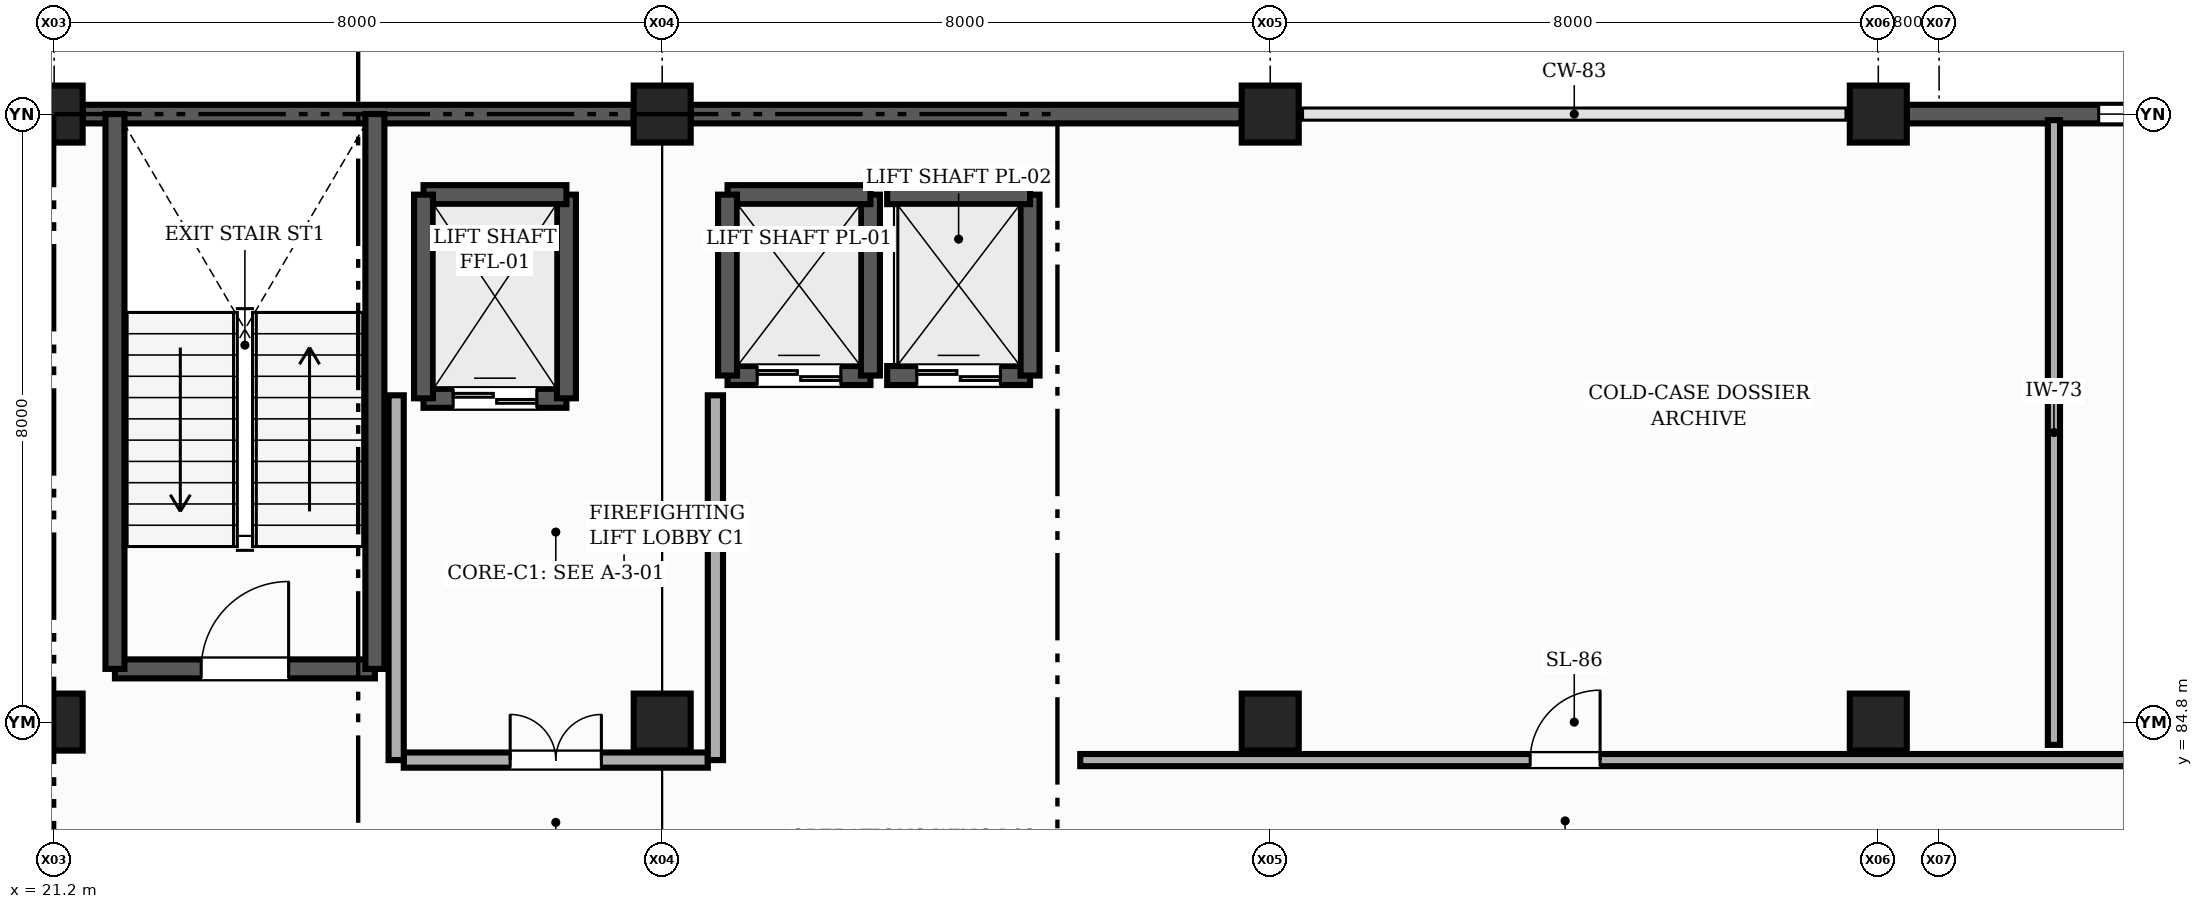
"""IFC4 building model, lengths in metres.
Left out: names, types, materials, properties, quantities, classifications, styles, units other than length and angle.
Written with IfcOpenShell. Run it as: python <this file> out.ifc"""

import sys

from ifc_helpers import new_model, si_unit, direction, frame, frame_2d, origin, origin_2d, place, context, subcontext, project, spatial, rectangle, extrude, element, fill, save


model = new_model("IFC4")
c1 = context("Model", 3, precision=1e-05, world=origin(), true_north=direction((0.0, 1.0)))
c2 = subcontext(c1, "Body", "Model", "MODEL_VIEW")
j1 = project(units=[si_unit("LENGTHUNIT", "METRE"), si_unit("PLANEANGLEUNIT", "RADIAN")], contexts=[c1])
p1 = place(None, origin())
s1 = spatial("IfcSite", under=j1, at=p1, CompositionType="ELEMENT")
p2 = place(p1, origin())
s2 = spatial("IfcBuilding", under=s1, at=p2, CompositionType="ELEMENT")
p3 = place(p2, frame((0.0, 0.0, 9.0)))
s3 = spatial("IfcBuildingStorey", under=s2, at=p3, CompositionType="ELEMENT", Elevation=9.0)
for number, where, z_axis, x_axis in (
    (1, (21.2, 84.8, 0.0), (0.0, 0.0, 1.0), (1.0, 0.0, 0.0)),
    (2, (21.2, 92.8, 0.0), (0.0, 0.0, 1.0), (1.0, 0.0, 0.0)),
    (3, (29.2, 84.8, 0.0), (0.0, 0.0, 1.0), (1.0, 0.0, 0.0)),
    (4, (29.2, 92.8, 0.0), (0.0, 0.0, 1.0), (1.0, 0.0, 0.0)),
    (5, (37.2, 84.8, 0.0), (0.0, 0.0, 1.0), (1.0, 0.0, 0.0)),
    (6, (37.2, 92.8, 0.0), (0.0, 0.0, 1.0), (1.0, 0.0, 0.0)),
    (7, (45.2, 84.8, 0.0), (0.0, 0.0, 1.0), (1.0, 0.0, 0.0)),
    (8, (45.2, 92.8, 0.0), (0.0, 0.0, 1.0), (1.0, 0.0, 0.0)),
):
    element("IfcColumn", number, at=place(p3, frame(where, z_axis=z_axis, x_axis=x_axis)), inside=s3, PredefinedType="COLUMN", context=c2, shape_type="SweptSolid", body=[
        extrude(rectangle(XDim=0.75, YDim=0.75, at=origin_2d()), origin(), (0.0, 0.0, 1.0), 4.5),
    ])
p4 = place(p3, frame((53.625, 92.8, 0.0), z_axis=(0.0, 0.0, 1.0), x_axis=(-1.0, 0.0, 0.0)))
e9 = element("IfcWall", 9, at=p4, inside=s3, PredefinedType="SOLIDWALL", context=c2, shape_type="SweptSolid", body=[
    extrude(rectangle(XDim=8.05, YDim=0.245, at=frame_2d((4.025, 0.0))), origin(), (0.0, 0.0, 1.0), 3.57),
])
p5 = place(p4, frame((2.525, 0.0, 0.9)))
e10 = element("IfcOpeningElement", 10, at=p5, cuts=e9, PredefinedType="OPENING", context=c2, shape_type="SweptSolid", body=[
    extrude(rectangle(XDim=3.0, YDim=1.8, at=frame_2d((1.5, 0.9))), frame((0.0, 0.133, 0.0), z_axis=(0.0, -1.0, 0.0), x_axis=(1.0, 0.0, 0.0)), (0.0, 0.0, 1.0), 0.265),
])
p6 = place(p3, frame((36.825, 92.8, 0.0), z_axis=(0.0, 0.0, 1.0), x_axis=(-1.0, 0.0, 0.0)))
e11 = element("IfcWall", 11, at=p6, inside=s3, PredefinedType="SOLIDWALL", context=c2, shape_type="SweptSolid", body=[
    extrude(rectangle(XDim=7.25, YDim=0.245, at=frame_2d((3.625, 0.0))), origin(), (0.0, 0.0, 1.0), 3.57),
])
p7 = place(p3, frame((28.825, 92.8, 0.0), z_axis=(0.0, 0.0, 1.0), x_axis=(-1.0, 0.0, 0.0)))
e12 = element("IfcWall", 12, at=p7, inside=s3, PredefinedType="SOLIDWALL", context=c2, shape_type="SweptSolid", body=[
    extrude(rectangle(XDim=7.25, YDim=0.245, at=frame_2d((3.625, 0.0))), origin(), (0.0, 0.0, 1.0), 4.22),
])
p8 = place(p3, frame((22.0, 85.5, 0.0), z_axis=(0.0, 0.0, 1.0), x_axis=(1.0, 0.0, 0.0)))
e13 = element("IfcWall", 13, at=p8, inside=s3, PredefinedType="SHEAR", context=c2, shape_type="SweptSolid", body=[
    extrude(rectangle(XDim=3.42, YDim=0.25, at=frame_2d((1.71, 0.0))), origin(), (0.0, 0.0, 1.0), 4.5),
])
p9 = place(p8, frame((1.135, 0.0, 0.0)))
e14 = element("IfcOpeningElement", 14, at=p9, cuts=e13, PredefinedType="OPENING", context=c2, shape_type="SweptSolid", body=[
    extrude(rectangle(XDim=1.15, YDim=2.15, at=frame_2d((0.575, 1.075))), frame((0.0, 0.135, 0.0), z_axis=(0.0, -1.0, 0.0), x_axis=(1.0, 0.0, 0.0)), (0.0, 0.0, 1.0), 0.27),
])
for number, where, z_axis, x_axis in (
    (15, (25.42, 85.5, 0.0), (0.0, 0.0, 1.0), (0.0, 1.0, 0.0)),
    (16, (22.0, 92.8, 0.0), (0.0, 0.0, 1.0), (0.0, -1.0, 0.0)),
):
    element("IfcWall", number, at=place(p3, frame(where, z_axis=z_axis, x_axis=x_axis)), inside=s3, PredefinedType="SHEAR", context=c2, shape_type="SweptSolid", body=[
        extrude(rectangle(XDim=7.3, YDim=0.25, at=frame_2d((3.65, 0.0))), origin(), (0.0, 0.0, 1.0), 4.5),
    ])
p10 = place(p3, frame((26.06, 89.06, 0.0), z_axis=(0.0, 0.0, 1.0), x_axis=(1.0, 0.0, 0.0)))
e17 = element("IfcWall", 17, at=p10, inside=s3, PredefinedType="SHEAR", context=c2, shape_type="SweptSolid", body=[
    extrude(rectangle(XDim=1.88, YDim=0.25, at=frame_2d((0.94, 0.0))), origin(), (0.0, 0.0, 1.0), 4.5),
])
p11 = place(p10, frame((0.39, 0.0, 0.0)))
e18 = element("IfcOpeningElement", 18, at=p11, cuts=e17, PredefinedType="OPENING", context=c2, shape_type="SweptSolid", body=[
    extrude(rectangle(XDim=1.1, YDim=2.2, at=frame_2d((0.55, 1.1))), frame((0.0, 0.135, 0.0), z_axis=(0.0, -1.0, 0.0), x_axis=(1.0, 0.0, 0.0)), (0.0, 0.0, 1.0), 0.27),
])
p12 = place(p3, frame((27.94, 89.06, 0.0), z_axis=(0.0, 0.0, 1.0), x_axis=(0.0, 1.0, 0.0)))
e19 = element("IfcWall", 19, at=p12, inside=s3, PredefinedType="SHEAR", context=c2, shape_type="SweptSolid", body=[
    extrude(rectangle(XDim=2.68, YDim=0.25, at=frame_2d((1.34, 0.0))), origin(), (0.0, 0.0, 1.0), 4.5),
])
p13 = place(p3, frame((27.94, 91.74, 0.0), z_axis=(0.0, 0.0, 1.0), x_axis=(-1.0, 0.0, 0.0)))
e20 = element("IfcWall", 20, at=p13, inside=s3, PredefinedType="SHEAR", context=c2, shape_type="SweptSolid", body=[
    extrude(rectangle(XDim=1.88, YDim=0.25, at=frame_2d((0.94, 0.0))), origin(), (0.0, 0.0, 1.0), 4.5),
])
p14 = place(p3, frame((26.06, 91.74, 0.0), z_axis=(0.0, 0.0, 1.0), x_axis=(0.0, -1.0, 0.0)))
e21 = element("IfcWall", 21, at=p14, inside=s3, PredefinedType="SHEAR", context=c2, shape_type="SweptSolid", body=[
    extrude(rectangle(XDim=2.68, YDim=0.25, at=frame_2d((1.34, 0.0))), origin(), (0.0, 0.0, 1.0), 4.5),
])
p15 = place(p3, frame((30.06, 89.36, 0.0), z_axis=(0.0, 0.0, 1.0), x_axis=(1.0, 0.0, 0.0)))
e22 = element("IfcWall", 22, at=p15, inside=s3, PredefinedType="SHEAR", context=c2, shape_type="SweptSolid", body=[
    extrude(rectangle(XDim=1.88, YDim=0.25, at=frame_2d((0.94, 0.0))), origin(), (0.0, 0.0, 1.0), 4.5),
])
p16 = place(p15, frame((0.39, 0.0, 0.0)))
e23 = element("IfcOpeningElement", 23, at=p16, cuts=e22, PredefinedType="OPENING", context=c2, shape_type="SweptSolid", body=[
    extrude(rectangle(XDim=1.1, YDim=2.2, at=frame_2d((0.55, 1.1))), frame((0.0, 0.135, 0.0), z_axis=(0.0, -1.0, 0.0), x_axis=(1.0, 0.0, 0.0)), (0.0, 0.0, 1.0), 0.27),
])
p17 = place(p3, frame((31.94, 89.36, 0.0), z_axis=(0.0, 0.0, 1.0), x_axis=(0.0, 1.0, 0.0)))
e24 = element("IfcWall", 24, at=p17, inside=s3, PredefinedType="SHEAR", context=c2, shape_type="SweptSolid", body=[
    extrude(rectangle(XDim=2.38, YDim=0.25, at=frame_2d((1.19, 0.0))), origin(), (0.0, 0.0, 1.0), 4.5),
])
p18 = place(p3, frame((31.94, 91.74, 0.0), z_axis=(0.0, 0.0, 1.0), x_axis=(-1.0, 0.0, 0.0)))
e25 = element("IfcWall", 25, at=p18, inside=s3, PredefinedType="SHEAR", context=c2, shape_type="SweptSolid", body=[
    extrude(rectangle(XDim=1.88, YDim=0.25, at=frame_2d((0.94, 0.0))), origin(), (0.0, 0.0, 1.0), 4.5),
])
p19 = place(p3, frame((30.06, 91.74, 0.0), z_axis=(0.0, 0.0, 1.0), x_axis=(0.0, -1.0, 0.0)))
e26 = element("IfcWall", 26, at=p19, inside=s3, PredefinedType="SHEAR", context=c2, shape_type="SweptSolid", body=[
    extrude(rectangle(XDim=2.38, YDim=0.25, at=frame_2d((1.19, 0.0))), origin(), (0.0, 0.0, 1.0), 4.5),
])
p20 = place(p3, frame((32.16, 89.36, 0.0), z_axis=(0.0, 0.0, 1.0), x_axis=(1.0, 0.0, 0.0)))
e27 = element("IfcWall", 27, at=p20, inside=s3, PredefinedType="SHEAR", context=c2, shape_type="SweptSolid", body=[
    extrude(rectangle(XDim=1.88, YDim=0.25, at=frame_2d((0.94, 0.0))), origin(), (0.0, 0.0, 1.0), 4.5),
])
p21 = place(p20, frame((0.39, 0.0, 0.0)))
e28 = element("IfcOpeningElement", 28, at=p21, cuts=e27, PredefinedType="OPENING", context=c2, shape_type="SweptSolid", body=[
    extrude(rectangle(XDim=1.1, YDim=2.2, at=frame_2d((0.55, 1.1))), frame((0.0, 0.135, 0.0), z_axis=(0.0, -1.0, 0.0), x_axis=(1.0, 0.0, 0.0)), (0.0, 0.0, 1.0), 0.27),
])
p22 = place(p3, frame((34.04, 89.36, 0.0), z_axis=(0.0, 0.0, 1.0), x_axis=(0.0, 1.0, 0.0)))
e29 = element("IfcWall", 29, at=p22, inside=s3, PredefinedType="SHEAR", context=c2, shape_type="SweptSolid", body=[
    extrude(rectangle(XDim=2.38, YDim=0.25, at=frame_2d((1.19, 0.0))), origin(), (0.0, 0.0, 1.0), 4.5),
])
p23 = place(p3, frame((34.04, 91.74, 0.0), z_axis=(0.0, 0.0, 1.0), x_axis=(-1.0, 0.0, 0.0)))
e30 = element("IfcWall", 30, at=p23, inside=s3, PredefinedType="SHEAR", context=c2, shape_type="SweptSolid", body=[
    extrude(rectangle(XDim=1.88, YDim=0.25, at=frame_2d((0.94, 0.0))), origin(), (0.0, 0.0, 1.0), 4.5),
])
p24 = place(p3, frame((25.8, 84.3, 0.0), z_axis=(0.0, 0.0, 1.0), x_axis=(1.0, 0.0, 0.0)))
e31 = element("IfcWall", 31, at=p24, inside=s3, PredefinedType="PARTITIONING", context=c2, shape_type="SweptSolid", body=[
    extrude(rectangle(XDim=4.0, YDim=0.2, at=frame_2d((2.0, 0.0))), origin(), (0.0, 0.0, 1.0), 3.555),
])
p25 = place(p24, frame((1.4, 0.0, 0.0)))
e32 = element("IfcOpeningElement", 32, at=p25, cuts=e31, PredefinedType="OPENING", context=c2, shape_type="SweptSolid", body=[
    extrude(rectangle(XDim=1.2, YDim=2.15, at=frame_2d((0.6, 1.075))), frame((0.0, 0.11, 0.0), z_axis=(0.0, -1.0, 0.0), x_axis=(1.0, 0.0, 0.0)), (0.0, 0.0, 1.0), 0.22),
])
p26 = place(p3, frame((25.7, 84.3, 0.0), z_axis=(0.0, 0.0, 1.0), x_axis=(0.0, 1.0, 0.0)))
e33 = element("IfcWall", 33, at=p26, inside=s3, PredefinedType="PARTITIONING", context=c2, shape_type="SweptSolid", body=[
    extrude(rectangle(XDim=4.8, YDim=0.2, at=frame_2d((2.4, 0.0))), origin(), (0.0, 0.0, 1.0), 3.355),
])
p27 = place(p3, frame((29.9, 84.3, 0.0), z_axis=(0.0, 0.0, 1.0), x_axis=(0.0, 1.0, 0.0)))
e34 = element("IfcWall", 34, at=p27, inside=s3, PredefinedType="PARTITIONING", context=c2, shape_type="SweptSolid", body=[
    extrude(rectangle(XDim=4.8, YDim=0.2, at=frame_2d((2.4, 0.0))), origin(), (0.0, 0.0, 1.0), 3.455),
])
p28 = place(p3, frame((47.511, 84.5, 0.0), z_axis=(0.0, 0.0, 1.0), x_axis=(0.0, 1.0, 0.0)))
e35 = element("IfcWall", 35, at=p28, inside=s3, PredefinedType="PARTITIONING", context=c2, shape_type="SweptSolid", body=[
    extrude(rectangle(XDim=8.22, YDim=0.16, at=frame_2d((4.11, 0.0))), origin(), (0.0, 0.0, 1.0), 3.555),
])
p29 = place(p3, frame((34.7, 84.3, 0.0), z_axis=(0.0, 0.0, 1.0), x_axis=(1.0, 0.0, 0.0)))
e36 = element("IfcWall", 36, at=p29, inside=s3, PredefinedType="PARTITIONING", context=c2, shape_type="SweptSolid", body=[
    extrude(rectangle(XDim=35.4, YDim=0.16, at=frame_2d((17.7, 0.0))), origin(), (0.0, 0.0, 1.0), 3.555),
])
p30 = place(p29, frame((5.92, 0.0, 0.0)))
e37 = element("IfcOpeningElement", 37, at=p30, cuts=e36, PredefinedType="OPENING", context=c2, shape_type="SweptSolid", body=[
    extrude(rectangle(XDim=0.92, YDim=2.1, at=frame_2d((0.46, 1.05))), frame((0.0, 0.09, 0.0), z_axis=(0.0, -1.0, 0.0), x_axis=(1.0, 0.0, 0.0)), (0.0, 0.0, 1.0), 0.18),
])
p31 = place(p29, frame((17.2, 0.0, 0.0)))
e38 = element("IfcOpeningElement", 38, at=p31, cuts=e36, PredefinedType="OPENING", context=c2, shape_type="SweptSolid", body=[
    extrude(rectangle(XDim=0.95, YDim=2.15, at=frame_2d((0.475, 1.075))), frame((0.0, 0.09, 0.0), z_axis=(0.0, -1.0, 0.0), x_axis=(1.0, 0.0, 0.0)), (0.0, 0.0, 1.0), 0.18),
])
p32 = place(p29, frame((28.48, 0.0, 0.0)))
e39 = element("IfcOpeningElement", 39, at=p32, cuts=e36, PredefinedType="OPENING", context=c2, shape_type="SweptSolid", body=[
    extrude(rectangle(XDim=0.98, YDim=2.12, at=frame_2d((0.49, 1.06))), frame((0.0, 0.09, 0.0), z_axis=(0.0, -1.0, 0.0), x_axis=(1.0, 0.0, 0.0)), (0.0, 0.0, 1.0), 0.18),
])
p33 = place(p5, origin())
e40 = element("IfcWindow", 40, at=p33, inside=s3, PartitioningType="SINGLE_PANEL", PredefinedType="WINDOW", context=c2, shape_type="SweptSolid", body=[
    extrude(rectangle(XDim=3.0, YDim=1.8, at=frame_2d((1.5, 0.9))), frame((0.0, 0.03, 0.0), z_axis=(0.0, -1.0, 0.0), x_axis=(1.0, 0.0, 0.0)), (0.0, 0.0, 1.0), 0.06),
])
fill(e10, e40)
p34 = place(p9, origin())
e41 = element("IfcDoor", 41, at=p34, inside=s3, OperationType="SINGLE_SWING_RIGHT", PredefinedType="DOOR", context=c2, shape_type="SweptSolid", body=[
    extrude(rectangle(XDim=1.15, YDim=2.15, at=frame_2d((0.575, 1.075))), frame((0.0, 0.025, 0.0), z_axis=(0.0, -1.0, 0.0), x_axis=(1.0, 0.0, 0.0)), (0.0, 0.0, 1.0), 0.05),
])
fill(e14, e41)
p35 = place(p11, origin())
e42 = element("IfcDoor", 42, at=p35, inside=s3, OperationType="DOUBLE_DOOR_SLIDING", PredefinedType="DOOR", context=c2, shape_type="SweptSolid", body=[
    extrude(rectangle(XDim=1.1, YDim=2.2, at=frame_2d((0.55, 1.1))), frame((0.0, 0.025, 0.0), z_axis=(0.0, -1.0, 0.0), x_axis=(1.0, 0.0, 0.0)), (0.0, 0.0, 1.0), 0.05),
])
fill(e18, e42)
p36 = place(p16, origin())
e43 = element("IfcDoor", 43, at=p36, inside=s3, OperationType="DOUBLE_DOOR_SLIDING", PredefinedType="DOOR", context=c2, shape_type="SweptSolid", body=[
    extrude(rectangle(XDim=1.1, YDim=2.2, at=frame_2d((0.55, 1.1))), frame((0.0, 0.025, 0.0), z_axis=(0.0, -1.0, 0.0), x_axis=(1.0, 0.0, 0.0)), (0.0, 0.0, 1.0), 0.05),
])
fill(e23, e43)
p37 = place(p21, origin())
e44 = element("IfcDoor", 44, at=p37, inside=s3, OperationType="DOUBLE_DOOR_SLIDING", PredefinedType="DOOR", context=c2, shape_type="SweptSolid", body=[
    extrude(rectangle(XDim=1.1, YDim=2.2, at=frame_2d((0.55, 1.1))), frame((0.0, 0.025, 0.0), z_axis=(0.0, -1.0, 0.0), x_axis=(1.0, 0.0, 0.0)), (0.0, 0.0, 1.0), 0.05),
])
fill(e28, e44)
p38 = place(p25, origin())
e45 = element("IfcDoor", 45, at=p38, inside=s3, OperationType="DOUBLE_DOOR_SINGLE_SWING", PredefinedType="DOOR", context=c2, shape_type="SweptSolid", body=[
    extrude(rectangle(XDim=1.2, YDim=2.15, at=frame_2d((0.6, 1.075))), frame((0.0, 0.025, 0.0), z_axis=(0.0, -1.0, 0.0), x_axis=(1.0, 0.0, 0.0)), (0.0, 0.0, 1.0), 0.05),
])
fill(e32, e45)
p39 = place(p30, origin())
e46 = element("IfcDoor", 46, at=p39, inside=s3, OperationType="SINGLE_SWING_RIGHT", PredefinedType="DOOR", context=c2, shape_type="SweptSolid", body=[
    extrude(rectangle(XDim=0.92, YDim=2.1, at=frame_2d((0.46, 1.05))), frame((0.0, 0.025, 0.0), z_axis=(0.0, -1.0, 0.0), x_axis=(1.0, 0.0, 0.0)), (0.0, 0.0, 1.0), 0.05),
])
fill(e37, e46)
save(model, sys.argv[1])
